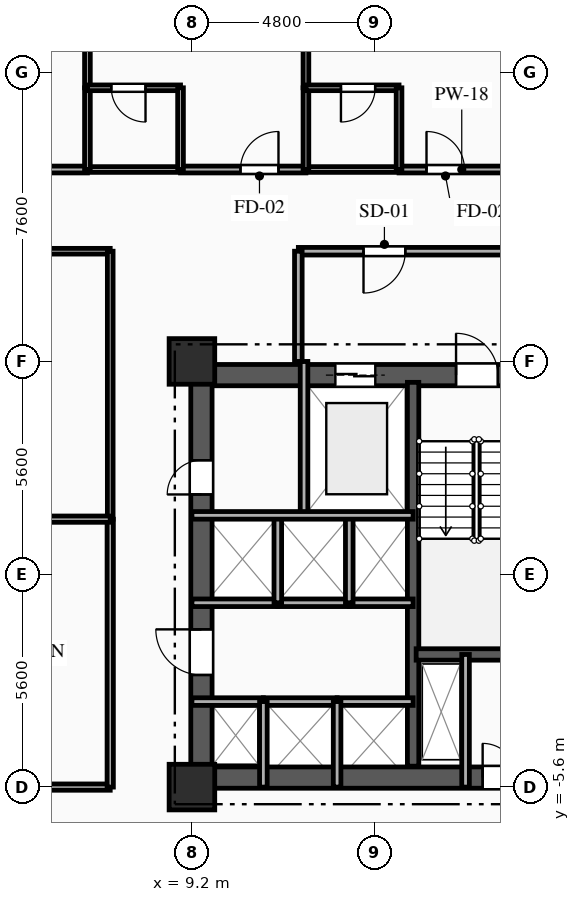
"""IFC4 building model, lengths in metres.
Left out: names, types, materials, properties, quantities, classifications, styles, units other than length and angle.
Written with IfcOpenShell. Run it as: python <this file> out.ifc"""

import sys

from ifc_helpers import new_model, si_unit, direction, frame, frame_2d, origin, origin_2d, place, context, subcontext, project, spatial, rectangle, extrude, element, fill, save


model = new_model("IFC4")
c1 = context("Model", 3, precision=1e-05, world=origin(), true_north=direction((0.0, 1.0)))
c2 = subcontext(c1, "Body", "Model", "MODEL_VIEW")
j1 = project(units=[si_unit("LENGTHUNIT", "METRE"), si_unit("PLANEANGLEUNIT", "RADIAN")], contexts=[c1])
p1 = place(None, origin())
s1 = spatial("IfcSite", under=j1, at=p1, CompositionType="ELEMENT")
p2 = place(p1, origin())
s2 = spatial("IfcBuilding", under=s1, at=p2, CompositionType="ELEMENT")
p3 = place(p2, frame((0.0, 0.0, 60.5)))
s3 = spatial("IfcBuildingStorey", under=s2, at=p3, CompositionType="ELEMENT", Elevation=60.5)
for number, where, z_axis, x_axis in (
    (1, (9.2, -5.6, 0.0), (0.0, 0.0, 1.0), (1.0, 0.0, 0.0)),
    (2, (9.2, 5.6, 0.0), (0.0, 0.0, 1.0), (1.0, 0.0, 0.0)),
):
    element("IfcColumn", number, at=place(p3, frame(where, z_axis=z_axis, x_axis=x_axis)), inside=s3, PredefinedType="COLUMN", context=c2, shape_type="SweptSolid", body=[
        extrude(rectangle(XDim=1.2, YDim=1.2, at=origin_2d()), origin(), (0.0, 0.0, 1.0), 3.35),
    ])
p4 = place(p3, frame((9.2, 5.24, 0.0), z_axis=(0.0, 0.0, 1.0), x_axis=(1.0, 0.0, 0.0)))
e3 = element("IfcWall", 3, at=p4, inside=s3, PredefinedType="SHEAR", context=c2, shape_type="SweptSolid", body=[
    extrude(rectangle(XDim=9.6, YDim=0.56, at=frame_2d((4.8, 0.0))), origin(), (0.0, 0.0, 1.0), 3.035),
])
p5 = place(p4, frame((6.95, 0.0, 0.0)))
e4 = element("IfcOpeningElement", 4, at=p5, cuts=e3, PredefinedType="OPENING", context=c2, shape_type="SweptSolid", body=[
    extrude(rectangle(XDim=1.1, YDim=2.15, at=frame_2d((0.55, 1.075))), frame((0.0, 0.29, 0.0), z_axis=(0.0, -1.0, 0.0), x_axis=(1.0, 0.0, 0.0)), (0.0, 0.0, 1.0), 0.58),
])
p6 = place(p4, frame((3.775, 0.0, 0.0)))
e5 = element("IfcOpeningElement", 5, at=p6, cuts=e3, PredefinedType="OPENING", context=c2, shape_type="SweptSolid", body=[
    extrude(rectangle(XDim=1.05, YDim=2.1, at=frame_2d((0.525, 1.05))), frame((0.0, 0.29, 0.0), z_axis=(0.0, -1.0, 0.0), x_axis=(1.0, 0.0, 0.0)), (0.0, 0.0, 1.0), 0.58),
])
p7 = place(p3, frame((9.2, -5.35, 0.0), z_axis=(0.0, 0.0, 1.0), x_axis=(1.0, 0.0, 0.0)))
e6 = element("IfcWall", 6, at=p7, inside=s3, PredefinedType="SHEAR", context=c2, shape_type="SweptSolid", body=[
    extrude(rectangle(XDim=9.6, YDim=0.56, at=frame_2d((4.8, 0.0))), origin(), (0.0, 0.0, 1.0), 3.035),
])
p8 = place(p7, frame((7.65, 0.0, 0.0)))
e7 = element("IfcOpeningElement", 7, at=p8, cuts=e6, PredefinedType="OPENING", context=c2, shape_type="SweptSolid", body=[
    extrude(rectangle(XDim=0.9, YDim=2.1, at=frame_2d((0.45, 1.05))), frame((0.0, 0.29, 0.0), z_axis=(0.0, -1.0, 0.0), x_axis=(1.0, 0.0, 0.0)), (0.0, 0.0, 1.0), 0.58),
])
p9 = place(p3, frame((9.45, -5.05, 0.0), z_axis=(0.0, 0.0, 1.0), x_axis=(0.0, 1.0, 0.0)))
e8 = element("IfcWall", 8, at=p9, inside=s3, PredefinedType="SHEAR", context=c2, shape_type="SweptSolid", body=[
    extrude(rectangle(XDim=10.1, YDim=0.56, at=frame_2d((5.05, 0.0))), origin(), (0.0, 0.0, 1.0), 3.035),
])
p10 = place(p9, frame((7.15, 0.0, 0.0)))
e9 = element("IfcOpeningElement", 9, at=p10, cuts=e8, PredefinedType="OPENING", context=c2, shape_type="SweptSolid", body=[
    extrude(rectangle(XDim=0.9, YDim=2.1, at=frame_2d((0.45, 1.05))), frame((0.0, 0.29, 0.0), z_axis=(0.0, -1.0, 0.0), x_axis=(1.0, 0.0, 0.0)), (0.0, 0.0, 1.0), 0.58),
])
p11 = place(p9, frame((2.4, 0.0, 0.0)))
e10 = element("IfcOpeningElement", 10, at=p11, cuts=e8, PredefinedType="OPENING", context=c2, shape_type="SweptSolid", body=[
    extrude(rectangle(XDim=1.2, YDim=2.15, at=frame_2d((0.6, 1.075))), frame((0.0, 0.29, 0.0), z_axis=(0.0, -1.0, 0.0), x_axis=(1.0, 0.0, 0.0)), (0.0, 0.0, 1.0), 0.58),
])
p12 = place(p3, frame((15.02, -5.05, 0.0), z_axis=(0.0, 0.0, 1.0), x_axis=(0.0, 1.0, 0.0)))
e11 = element("IfcWall", 11, at=p12, inside=s3, PredefinedType="SHEAR", context=c2, shape_type="SweptSolid", body=[
    extrude(rectangle(XDim=10.1, YDim=0.3, at=frame_2d((5.05, 0.0))), origin(), (0.0, 0.0, 1.0), 3.035),
])
p13 = place(p3, frame((15.1, -2.11, 0.0), z_axis=(0.0, 0.0, 1.0), x_axis=(1.0, 0.0, 0.0)))
e12 = element("IfcWall", 12, at=p13, inside=s3, PredefinedType="SHEAR", context=c2, shape_type="SweptSolid", body=[
    extrude(rectangle(XDim=3.18, YDim=0.3, at=frame_2d((1.59, 0.0))), origin(), (0.0, 0.0, 1.0), 3.035),
])
p14 = place(p3, frame((16.4, -2.11, 0.0), z_axis=(0.0, 0.0, 1.0), x_axis=(0.0, -1.0, 0.0)))
e13 = element("IfcWall", 13, at=p14, inside=s3, PredefinedType="PARTITIONING", context=c2, shape_type="SweptSolid", body=[
    extrude(rectangle(XDim=3.49, YDim=0.2, at=frame_2d((1.745, 0.0))), origin(), (0.0, 0.0, 1.0), 3.035),
])
p15 = place(p3, frame((12.15, 5.6, 0.0), z_axis=(0.0, 0.0, 1.0), x_axis=(0.0, -1.0, 0.0)))
e14 = element("IfcWall", 14, at=p15, inside=s3, PredefinedType="PARTITIONING", context=c2, shape_type="SweptSolid", body=[
    extrude(rectangle(XDim=4.05, YDim=0.2, at=frame_2d((2.025, 0.0))), origin(), (0.0, 0.0, 1.0), 3.035),
])
p16 = place(p3, frame((18.8, 8.5, 0.0), z_axis=(0.0, 0.0, 1.0), x_axis=(-1.0, 0.0, 0.0)))
e15 = element("IfcWall", 15, at=p16, inside=s3, PredefinedType="PARTITIONING", context=c2, shape_type="SweptSolid", body=[
    extrude(rectangle(XDim=6.8, YDim=0.2, at=frame_2d((3.4, 0.0))), origin(), (0.0, 0.0, 1.0), 3.035),
])
p17 = place(p16, frame((3.985, 0.0, 0.0)))
e16 = element("IfcOpeningElement", 16, at=p17, cuts=e15, PredefinedType="OPENING", context=c2, shape_type="SweptSolid", body=[
    extrude(rectangle(XDim=1.1, YDim=2.15, at=frame_2d((0.55, 1.075))), frame((0.0, 0.11, 0.0), z_axis=(0.0, -1.0, 0.0), x_axis=(1.0, 0.0, 0.0)), (0.0, 0.0, 1.0), 0.22),
])
p18 = place(p3, frame((12.0, 8.5, 0.0), z_axis=(0.0, 0.0, 1.0), x_axis=(0.0, -1.0, 0.0)))
e17 = element("IfcWall", 17, at=p18, inside=s3, PredefinedType="PARTITIONING", context=c2, shape_type="SweptSolid", body=[
    extrude(rectangle(XDim=2.9, YDim=0.2, at=frame_2d((1.45, 0.0))), origin(), (0.0, 0.0, 1.0), 3.035),
])
p19 = place(p3, frame((9.2, -3.35, 0.0), z_axis=(0.0, 0.0, 1.0), x_axis=(1.0, 0.0, 0.0)))
e18 = element("IfcWall", 18, at=p19, inside=s3, PredefinedType="PARTITIONING", context=c2, shape_type="SweptSolid", body=[
    extrude(rectangle(XDim=1.88, YDim=0.2, at=frame_2d((0.94, 0.0))), origin(), (0.0, 0.0, 1.0), 2.75),
])
p20 = place(p3, frame((11.08, -3.35, 0.0), z_axis=(0.0, 0.0, 1.0), x_axis=(1.0, 0.0, 0.0)))
e19 = element("IfcWall", 19, at=p20, inside=s3, PredefinedType="PARTITIONING", context=c2, shape_type="SweptSolid", body=[
    extrude(rectangle(XDim=1.94, YDim=0.2, at=frame_2d((0.97, 0.0))), origin(), (0.0, 0.0, 1.0), 3.035),
])
p21 = place(p3, frame((13.02, -3.35, 0.0), z_axis=(0.0, 0.0, 1.0), x_axis=(1.0, 0.0, 0.0)))
e20 = element("IfcWall", 20, at=p21, inside=s3, PredefinedType="PARTITIONING", context=c2, shape_type="SweptSolid", body=[
    extrude(rectangle(XDim=2.0, YDim=0.2, at=frame_2d((1.0, 0.0))), origin(), (0.0, 0.0, 1.0), 3.035),
])
p22 = place(p3, frame((11.46, -0.75, 0.0), z_axis=(0.0, 0.0, 1.0), x_axis=(-1.0, 0.0, 0.0)))
e21 = element("IfcWall", 21, at=p22, inside=s3, PredefinedType="PARTITIONING", context=c2, shape_type="SweptSolid", body=[
    extrude(rectangle(XDim=2.26, YDim=0.2, at=frame_2d((1.13, 0.0))), origin(), (0.0, 0.0, 1.0), 3.035),
])
p23 = place(p3, frame((13.34, -0.75, 0.0), z_axis=(0.0, 0.0, 1.0), x_axis=(-1.0, 0.0, 0.0)))
e22 = element("IfcWall", 22, at=p23, inside=s3, PredefinedType="PARTITIONING", context=c2, shape_type="SweptSolid", body=[
    extrude(rectangle(XDim=1.88, YDim=0.2, at=frame_2d((0.94, 0.0))), origin(), (0.0, 0.0, 1.0), 3.035),
])
p24 = place(p3, frame((15.02, -0.75, 0.0), z_axis=(0.0, 0.0, 1.0), x_axis=(-1.0, 0.0, 0.0)))
e23 = element("IfcWall", 23, at=p24, inside=s3, PredefinedType="PARTITIONING", context=c2, shape_type="SweptSolid", body=[
    extrude(rectangle(XDim=1.68, YDim=0.2, at=frame_2d((0.84, 0.0))), origin(), (0.0, 0.0, 1.0), 3.035),
])
for number, where, z_axis, x_axis in (
    (24, (11.08, -5.6, 0.0), (0.0, 0.0, 1.0), (0.0, 1.0, 0.0)),
    (25, (13.02, -5.6, 0.0), (0.0, 0.0, 1.0), (0.0, 1.0, 0.0)),
):
    element("IfcWall", number, at=place(p3, frame(where, z_axis=z_axis, x_axis=x_axis)), inside=s3, PredefinedType="PARTITIONING", context=c2, shape_type="SweptSolid", body=[
        extrude(rectangle(XDim=2.25, YDim=0.2, at=frame_2d((1.125, 0.0))), origin(), (0.0, 0.0, 1.0), 3.035),
    ])
for number, where, z_axis, x_axis in (
    (26, (11.46, -0.75, 0.0), (0.0, 0.0, 1.0), (0.0, 1.0, 0.0)),
    (27, (13.34, -0.75, 0.0), (0.0, 0.0, 1.0), (0.0, 1.0, 0.0)),
):
    element("IfcWall", number, at=place(p3, frame(where, z_axis=z_axis, x_axis=x_axis)), inside=s3, PredefinedType="PARTITIONING", context=c2, shape_type="SweptSolid", body=[
        extrude(rectangle(XDim=2.3, YDim=0.2, at=frame_2d((1.15, 0.0))), origin(), (0.0, 0.0, 1.0), 3.035),
    ])
p25 = place(p3, frame((3.15, 10.65, 0.0), z_axis=(0.0, 0.0, 1.0), x_axis=(1.0, 0.0, 0.0)))
e28 = element("IfcWall", 28, at=p25, inside=s3, PredefinedType="PARTITIONING", context=c2, shape_type="SweptSolid", body=[
    extrude(rectangle(XDim=3.3, YDim=0.18, at=frame_2d((1.65, 0.0))), origin(), (0.0, 0.0, 1.0), 3.035),
])
p26 = place(p25, frame((0.722, 0.0, 0.0)))
e29 = element("IfcOpeningElement", 29, at=p26, cuts=e28, PredefinedType="OPENING", context=c2, shape_type="SweptSolid", body=[
    extrude(rectangle(XDim=1.0, YDim=2.15, at=frame_2d((0.5, 1.075))), frame((0.0, 0.1, 0.0), z_axis=(0.0, -1.0, 0.0), x_axis=(1.0, 0.0, 0.0)), (0.0, 0.0, 1.0), 0.2),
])
p27 = place(p3, frame((8.9, 10.65, 0.0), z_axis=(0.0, 0.0, 1.0), x_axis=(1.0, 0.0, 0.0)))
e30 = element("IfcWall", 30, at=p27, inside=s3, PredefinedType="PARTITIONING", context=c2, shape_type="SweptSolid", body=[
    extrude(rectangle(XDim=3.3, YDim=0.18, at=frame_2d((1.65, 0.0))), origin(), (0.0, 0.0, 1.0), 3.035),
])
p28 = place(p27, frame((1.577, 0.0, 0.0)))
e31 = element("IfcOpeningElement", 31, at=p28, cuts=e30, PredefinedType="OPENING", context=c2, shape_type="SweptSolid", body=[
    extrude(rectangle(XDim=1.0, YDim=2.15, at=frame_2d((0.5, 1.075))), frame((0.0, 0.1, 0.0), z_axis=(0.0, -1.0, 0.0), x_axis=(1.0, 0.0, 0.0)), (0.0, 0.0, 1.0), 0.2),
])
p29 = place(p3, frame((6.45, 10.65, 0.0), z_axis=(0.0, 0.0, 1.0), x_axis=(1.0, 0.0, 0.0)))
e32 = element("IfcWall", 32, at=p29, inside=s3, PredefinedType="PLUMBINGWALL", context=c2, shape_type="SweptSolid", body=[
    extrude(rectangle(XDim=2.45, YDim=0.15, at=frame_2d((1.225, 0.0))), origin(), (0.0, 0.0, 1.0), 3.035),
])
p30 = place(p3, frame((14.65, 10.65, 0.0), z_axis=(0.0, 0.0, 1.0), x_axis=(1.0, 0.0, 0.0)))
e33 = element("IfcWall", 33, at=p30, inside=s3, PredefinedType="PARTITIONING", context=c2, shape_type="SweptSolid", body=[
    extrude(rectangle(XDim=3.3, YDim=0.18, at=frame_2d((1.65, 0.0))), origin(), (0.0, 0.0, 1.0), 3.035),
])
p31 = place(p30, frame((0.722, 0.0, 0.0)))
e34 = element("IfcOpeningElement", 34, at=p31, cuts=e33, PredefinedType="OPENING", context=c2, shape_type="SweptSolid", body=[
    extrude(rectangle(XDim=1.0, YDim=2.15, at=frame_2d((0.5, 1.075))), frame((0.0, 0.1, 0.0), z_axis=(0.0, -1.0, 0.0), x_axis=(1.0, 0.0, 0.0)), (0.0, 0.0, 1.0), 0.2),
])
p32 = place(p3, frame((12.2, 10.65, 0.0), z_axis=(0.0, 0.0, 1.0), x_axis=(1.0, 0.0, 0.0)))
e35 = element("IfcWall", 35, at=p32, inside=s3, PredefinedType="PLUMBINGWALL", context=c2, shape_type="SweptSolid", body=[
    extrude(rectangle(XDim=2.45, YDim=0.15, at=frame_2d((1.225, 0.0))), origin(), (0.0, 0.0, 1.0), 3.035),
])
p33 = place(p3, frame((7.05, 8.5, 0.0), z_axis=(0.0, 0.0, 1.0), x_axis=(-1.0, 0.0, 0.0)))
e36 = element("IfcWall", 36, at=p33, inside=s3, PredefinedType="PARTITIONING", context=c2, shape_type="SweptSolid", body=[
    extrude(rectangle(XDim=7.05, YDim=0.15, at=frame_2d((3.525, 0.0))), origin(), (0.0, 0.0, 1.0), 3.035),
])
p34 = place(p3, frame((0.0, -5.6, 0.0), z_axis=(0.0, 0.0, 1.0), x_axis=(1.0, 0.0, 0.0)))
e37 = element("IfcWall", 37, at=p34, inside=s3, PredefinedType="PARTITIONING", context=c2, shape_type="SweptSolid", body=[
    extrude(rectangle(XDim=7.05, YDim=0.165, at=frame_2d((3.525, 0.0))), origin(), (0.0, 0.0, 1.0), 2.52),
])
p35 = place(p3, frame((7.05, -5.6, 0.0), z_axis=(0.0, 0.0, 1.0), x_axis=(0.0, 1.0, 0.0)))
e38 = element("IfcWall", 38, at=p35, inside=s3, PredefinedType="PARTITIONING", context=c2, shape_type="SweptSolid", body=[
    extrude(rectangle(XDim=7.05, YDim=0.165, at=frame_2d((3.525, 0.0))), origin(), (0.0, 0.0, 1.0), 3.035),
])
p36 = place(p3, frame((7.05, 1.45, 0.0), z_axis=(0.0, 0.0, 1.0), x_axis=(0.0, 1.0, 0.0)))
e39 = element("IfcWall", 39, at=p36, inside=s3, PredefinedType="PARTITIONING", context=c2, shape_type="SweptSolid", body=[
    extrude(rectangle(XDim=7.05, YDim=0.15, at=frame_2d((3.525, 0.0))), origin(), (0.0, 0.0, 1.0), 3.035),
])
p37 = place(p3, frame((6.45, 19.4, 0.0), z_axis=(0.0, 0.0, 1.0), x_axis=(0.0, -1.0, 0.0)))
e40 = element("IfcWall", 40, at=p37, inside=s3, PredefinedType="PARTITIONING", context=c2, shape_type="SweptSolid", body=[
    extrude(rectangle(XDim=6.6, YDim=0.15, at=frame_2d((3.3, 0.0))), origin(), (0.0, 0.0, 1.0), 3.035),
])
p38 = place(p3, frame((6.45, 12.8, 0.0), z_axis=(0.0, 0.0, 1.0), x_axis=(0.0, -1.0, 0.0)))
e41 = element("IfcWall", 41, at=p38, inside=s3, PredefinedType="PLUMBINGWALL", context=c2, shape_type="SweptSolid", body=[
    extrude(rectangle(XDim=2.15, YDim=0.15, at=frame_2d((1.075, 0.0))), origin(), (0.0, 0.0, 1.0), 3.035),
])
p39 = place(p3, frame((8.9, 12.8, 0.0), z_axis=(0.0, 0.0, 1.0), x_axis=(-1.0, 0.0, 0.0)))
e42 = element("IfcWall", 42, at=p39, inside=s3, PredefinedType="PLUMBINGWALL", context=c2, shape_type="SweptSolid", body=[
    extrude(rectangle(XDim=2.45, YDim=0.15, at=frame_2d((1.225, 0.0))), origin(), (0.0, 0.0, 1.0), 3.035),
])
p40 = place(p39, frame((0.921, 0.0, 0.0)))
e43 = element("IfcOpeningElement", 43, at=p40, cuts=e42, PredefinedType="OPENING", context=c2, shape_type="SweptSolid", body=[
    extrude(rectangle(XDim=0.9, YDim=2.1, at=frame_2d((0.45, 1.05))), frame((0.0, 0.085, 0.0), z_axis=(0.0, -1.0, 0.0), x_axis=(1.0, 0.0, 0.0)), (0.0, 0.0, 1.0), 0.17),
])
p41 = place(p3, frame((8.9, 10.65, 0.0), z_axis=(0.0, 0.0, 1.0), x_axis=(0.0, 1.0, 0.0)))
e44 = element("IfcWall", 44, at=p41, inside=s3, PredefinedType="PLUMBINGWALL", context=c2, shape_type="SweptSolid", body=[
    extrude(rectangle(XDim=2.15, YDim=0.15, at=frame_2d((1.075, 0.0))), origin(), (0.0, 0.0, 1.0), 3.035),
])
p42 = place(p3, frame((12.2, 19.4, 0.0), z_axis=(0.0, 0.0, 1.0), x_axis=(0.0, -1.0, 0.0)))
e45 = element("IfcWall", 45, at=p42, inside=s3, PredefinedType="PARTITIONING", context=c2, shape_type="SweptSolid", body=[
    extrude(rectangle(XDim=6.6, YDim=0.15, at=frame_2d((3.3, 0.0))), origin(), (0.0, 0.0, 1.0), 3.035),
])
p43 = place(p3, frame((12.2, 12.8, 0.0), z_axis=(0.0, 0.0, 1.0), x_axis=(0.0, -1.0, 0.0)))
e46 = element("IfcWall", 46, at=p43, inside=s3, PredefinedType="PLUMBINGWALL", context=c2, shape_type="SweptSolid", body=[
    extrude(rectangle(XDim=2.15, YDim=0.15, at=frame_2d((1.075, 0.0))), origin(), (0.0, 0.0, 1.0), 3.035),
])
p44 = place(p3, frame((14.65, 12.8, 0.0), z_axis=(0.0, 0.0, 1.0), x_axis=(-1.0, 0.0, 0.0)))
e47 = element("IfcWall", 47, at=p44, inside=s3, PredefinedType="PLUMBINGWALL", context=c2, shape_type="SweptSolid", body=[
    extrude(rectangle(XDim=2.45, YDim=0.15, at=frame_2d((1.225, 0.0))), origin(), (0.0, 0.0, 1.0), 3.035),
])
p45 = place(p44, frame((0.629, 0.0, 0.0)))
e48 = element("IfcOpeningElement", 48, at=p45, cuts=e47, PredefinedType="OPENING", context=c2, shape_type="SweptSolid", body=[
    extrude(rectangle(XDim=0.9, YDim=2.1, at=frame_2d((0.45, 1.05))), frame((0.0, 0.085, 0.0), z_axis=(0.0, -1.0, 0.0), x_axis=(1.0, 0.0, 0.0)), (0.0, 0.0, 1.0), 0.17),
])
p46 = place(p3, frame((14.65, 10.65, 0.0), z_axis=(0.0, 0.0, 1.0), x_axis=(0.0, 1.0, 0.0)))
e49 = element("IfcWall", 49, at=p46, inside=s3, PredefinedType="PLUMBINGWALL", context=c2, shape_type="SweptSolid", body=[
    extrude(rectangle(XDim=2.15, YDim=0.15, at=frame_2d((1.075, 0.0))), origin(), (0.0, 0.0, 1.0), 3.035),
])
p47 = place(p3, frame((-7.05, 1.45, 0.0), z_axis=(0.0, 0.0, 1.0), x_axis=(1.0, 0.0, 0.0)))
e50 = element("IfcWall", 50, at=p47, inside=s3, PredefinedType="PARTITIONING", context=c2, shape_type="SweptSolid", body=[
    extrude(rectangle(XDim=14.1, YDim=0.165, at=frame_2d((7.05, 0.0))), origin(), (0.0, 0.0, 1.0), 3.035),
])
p48 = place(p3, frame((9.2, 1.55, 0.0), z_axis=(0.0, 0.0, 1.0), x_axis=(1.0, 0.0, 0.0)))
e51 = element("IfcWall", 51, at=p48, inside=s3, PredefinedType="PARTITIONING", context=c2, shape_type="SweptSolid", body=[
    extrude(rectangle(XDim=5.82, YDim=0.2, at=frame_2d((2.91, 0.0))), origin(), (0.0, 0.0, 1.0), 3.035),
])
p49 = place(p5, origin())
e52 = element("IfcDoor", 52, at=p49, inside=s3, OperationType="SINGLE_SWING_LEFT", PredefinedType="DOOR", context=c2, shape_type="SweptSolid", body=[
    extrude(rectangle(XDim=1.1, YDim=2.15, at=frame_2d((0.55, 1.075))), frame((0.0, 0.025, 0.0), z_axis=(0.0, -1.0, 0.0), x_axis=(1.0, 0.0, 0.0)), (0.0, 0.0, 1.0), 0.05),
])
fill(e4, e52)
p50 = place(p6, origin())
e53 = element("IfcDoor", 53, at=p50, inside=s3, OperationType="DOUBLE_DOOR_SLIDING", PredefinedType="DOOR", context=c2, shape_type="SweptSolid", body=[
    extrude(rectangle(XDim=1.05, YDim=2.1, at=frame_2d((0.525, 1.05))), frame((0.0, 0.025, 0.0), z_axis=(0.0, -1.0, 0.0), x_axis=(1.0, 0.0, 0.0)), (0.0, 0.0, 1.0), 0.05),
])
fill(e5, e53)
p51 = place(p8, origin())
e54 = element("IfcDoor", 54, at=p51, inside=s3, OperationType="SINGLE_SWING_LEFT", PredefinedType="DOOR", context=c2, shape_type="SweptSolid", body=[
    extrude(rectangle(XDim=0.9, YDim=2.1, at=frame_2d((0.45, 1.05))), frame((0.0, 0.025, 0.0), z_axis=(0.0, -1.0, 0.0), x_axis=(1.0, 0.0, 0.0)), (0.0, 0.0, 1.0), 0.05),
])
fill(e7, e54)
p52 = place(p17, origin())
e55 = element("IfcDoor", 55, at=p52, inside=s3, OperationType="SINGLE_SWING_RIGHT", PredefinedType="DOOR", context=c2, shape_type="SweptSolid", body=[
    extrude(rectangle(XDim=1.1, YDim=2.15, at=frame_2d((0.55, 1.075))), frame((0.0, 0.025, 0.0), z_axis=(0.0, -1.0, 0.0), x_axis=(1.0, 0.0, 0.0)), (0.0, 0.0, 1.0), 0.05),
])
fill(e16, e55)
p53 = place(p10, origin())
e56 = element("IfcDoor", 56, at=p53, inside=s3, OperationType="SINGLE_SWING_LEFT", PredefinedType="DOOR", context=c2, shape_type="SweptSolid", body=[
    extrude(rectangle(XDim=0.9, YDim=2.1, at=frame_2d((0.45, 1.05))), frame((0.0, 0.025, 0.0), z_axis=(0.0, -1.0, 0.0), x_axis=(1.0, 0.0, 0.0)), (0.0, 0.0, 1.0), 0.05),
])
fill(e9, e56)
p54 = place(p11, origin())
e57 = element("IfcDoor", 57, at=p54, inside=s3, OperationType="SINGLE_SWING_RIGHT", PredefinedType="DOOR", context=c2, shape_type="SweptSolid", body=[
    extrude(rectangle(XDim=1.2, YDim=2.15, at=frame_2d((0.6, 1.075))), frame((0.0, 0.025, 0.0), z_axis=(0.0, -1.0, 0.0), x_axis=(1.0, 0.0, 0.0)), (0.0, 0.0, 1.0), 0.05),
])
fill(e10, e57)
p55 = place(p28, origin())
e58 = element("IfcDoor", 58, at=p55, inside=s3, OperationType="SINGLE_SWING_RIGHT", PredefinedType="DOOR", context=c2, shape_type="SweptSolid", body=[
    extrude(rectangle(XDim=1.0, YDim=2.15, at=frame_2d((0.5, 1.075))), frame((0.0, 0.025, 0.0), z_axis=(0.0, -1.0, 0.0), x_axis=(1.0, 0.0, 0.0)), (0.0, 0.0, 1.0), 0.05),
])
fill(e31, e58)
p56 = place(p31, origin())
e59 = element("IfcDoor", 59, at=p56, inside=s3, OperationType="SINGLE_SWING_LEFT", PredefinedType="DOOR", context=c2, shape_type="SweptSolid", body=[
    extrude(rectangle(XDim=1.0, YDim=2.15, at=frame_2d((0.5, 1.075))), frame((0.0, 0.025, 0.0), z_axis=(0.0, -1.0, 0.0), x_axis=(1.0, 0.0, 0.0)), (0.0, 0.0, 1.0), 0.05),
])
fill(e34, e59)
p57 = place(p40, origin())
e60 = element("IfcDoor", 60, at=p57, inside=s3, OperationType="SINGLE_SWING_LEFT", PredefinedType="DOOR", context=c2, shape_type="SweptSolid", body=[
    extrude(rectangle(XDim=0.9, YDim=2.1, at=frame_2d((0.45, 1.05))), frame((0.0, 0.025, 0.0), z_axis=(0.0, -1.0, 0.0), x_axis=(1.0, 0.0, 0.0)), (0.0, 0.0, 1.0), 0.05),
])
fill(e43, e60)
p58 = place(p45, origin())
e61 = element("IfcDoor", 61, at=p58, inside=s3, OperationType="SINGLE_SWING_RIGHT", PredefinedType="DOOR", context=c2, shape_type="SweptSolid", body=[
    extrude(rectangle(XDim=0.9, YDim=2.1, at=frame_2d((0.45, 1.05))), frame((0.0, 0.025, 0.0), z_axis=(0.0, -1.0, 0.0), x_axis=(1.0, 0.0, 0.0)), (0.0, 0.0, 1.0), 0.05),
])
fill(e48, e61)
save(model, sys.argv[1])
